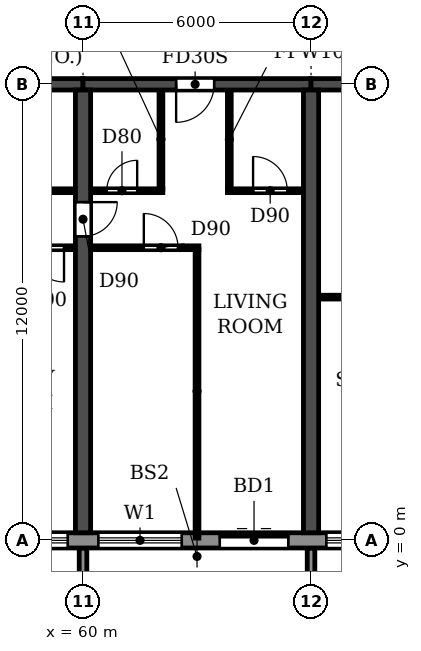
"""IFC4 building model, lengths in metres.
Left out: names, types, materials, properties, quantities, classifications, styles, units other than length and angle.
Written with IfcOpenShell. Run it as: python <this file> out.ifc"""

import sys

from ifc_helpers import new_model, si_unit, direction, frame, frame_2d, origin, place, context, subcontext, project, spatial, polyline, rectangle, outline, extrude, source, transform, mapped, element, fill, save


model = new_model("IFC4")
c1 = context("Model", 3, precision=1e-05, world=origin(), true_north=direction((0.0, 1.0)))
c2 = subcontext(c1, "Body", "Model", "MODEL_VIEW")
j1 = project(units=[si_unit("LENGTHUNIT", "METRE"), si_unit("PLANEANGLEUNIT", "RADIAN")], contexts=[c1])
p1 = place(None, origin())
s1 = spatial("IfcSite", under=j1, at=p1, CompositionType="ELEMENT")
p2 = place(p1, origin())
s2 = spatial("IfcBuilding", under=s1, at=p2, CompositionType="ELEMENT")
p3 = place(p2, frame((0.0, 0.0, 43.2)))
s3 = spatial("IfcBuildingStorey", under=s2, at=p3, CompositionType="ELEMENT", Elevation=43.2)
p4 = place(p3, frame((60.0, 0.2, 0.0), z_axis=(0.0, 0.0, 1.0), x_axis=(0.0, 1.0, 0.0)))
e1 = element("IfcWall", 1, at=p4, inside=s3, PredefinedType="SHEAR", context=c2, shape_type="SweptSolid", body=[
    extrude(rectangle(XDim=11.65, YDim=0.4, at=frame_2d((5.825, 0.0))), origin(), (0.0, 0.0, 1.0), 3.05),
])
p5 = place(p4, frame((7.8, 0.0, 0.0)))
e2 = element("IfcOpeningElement", 2, at=p5, cuts=e1, PredefinedType="OPENING", context=c2, shape_type="SweptSolid", body=[
    extrude(rectangle(XDim=0.9, YDim=2.1, at=frame_2d((0.45, 1.05))), frame((0.0, 0.21, 0.0), z_axis=(0.0, -1.0, 0.0), x_axis=(1.0, 0.0, 0.0)), (0.0, 0.0, 1.0), 0.42),
])
p6 = place(p3, frame((66.0, 0.2, 0.0), z_axis=(0.0, 0.0, 1.0), x_axis=(0.0, 1.0, 0.0)))
e3 = element("IfcWall", 3, at=p6, inside=s3, PredefinedType="SHEAR", context=c2, shape_type="SweptSolid", body=[
    extrude(rectangle(XDim=11.65, YDim=0.4, at=frame_2d((5.825, 0.0))), origin(), (0.0, 0.0, 1.0), 3.05),
])
p7 = place(p3, frame((54.0, 12.0, 0.0), z_axis=(0.0, 0.0, 1.0), x_axis=(1.0, 0.0, 0.0)))
e4 = element("IfcWall", 4, at=p7, inside=s3, PredefinedType="SHEAR", context=c2, shape_type="SweptSolid", body=[
    extrude(rectangle(XDim=6.0, YDim=0.3, at=frame_2d((3.0, 0.0))), origin(), (0.0, 0.0, 1.0), 2.45),
])
p8 = place(p3, frame((60.0, 12.0, 0.0), z_axis=(0.0, 0.0, 1.0), x_axis=(1.0, 0.0, 0.0)))
e5 = element("IfcWall", 5, at=p8, inside=s3, PredefinedType="SHEAR", context=c2, shape_type="SweptSolid", body=[
    extrude(rectangle(XDim=6.0, YDim=0.3, at=frame_2d((3.0, 0.0))), origin(), (0.0, 0.0, 1.0), 2.45),
])
p9 = place(p8, frame((2.45, 0.0, 0.0)))
e6 = element("IfcOpeningElement", 6, at=p9, cuts=e5, PredefinedType="OPENING", context=c2, shape_type="SweptSolid", body=[
    extrude(rectangle(XDim=1.0, YDim=2.1, at=frame_2d((0.5, 1.05))), frame((0.0, 0.16, 0.0), z_axis=(0.0, -1.0, 0.0), x_axis=(1.0, 0.0, 0.0)), (0.0, 0.0, 1.0), 0.32),
])
p10 = place(p3, frame((66.0, 12.0, 0.0), z_axis=(0.0, 0.0, 1.0), x_axis=(1.0, 0.0, 0.0)))
e7 = element("IfcWall", 7, at=p10, inside=s3, PredefinedType="SHEAR", context=c2, shape_type="SweptSolid", body=[
    extrude(rectangle(XDim=6.0, YDim=0.3, at=frame_2d((3.0, 0.0))), origin(), (0.0, 0.0, 1.0), 2.45),
])
p11 = place(p10, frame((2.55, 0.0, 0.0)))
e8 = element("IfcOpeningElement", 8, at=p11, cuts=e7, PredefinedType="OPENING", context=c2, shape_type="SweptSolid", body=[
    extrude(rectangle(XDim=1.0, YDim=2.1, at=frame_2d((0.5, 1.05))), frame((0.0, 0.16, 0.0), z_axis=(0.0, -1.0, 0.0), x_axis=(1.0, 0.0, 0.0)), (0.0, 0.0, 1.0), 0.32),
])
p12 = place(p3, frame((4.683, 0.0, 0.0), z_axis=(0.0, 0.0, 1.0), x_axis=(1.0, 0.0, 0.0)))
e9 = element("IfcWall", 9, at=p12, inside=s3, PredefinedType="STANDARD", context=c2, shape_type="SweptSolid", body=[
    extrude(rectangle(XDim=92.634, YDim=0.4, at=frame_2d((46.317, 0.0))), origin(), (0.0, 0.0, 1.0), 3.05),
])
p13 = place(p12, frame((1.717, 0.0, 0.9)))
e10 = element("IfcOpeningElement", 10, at=p13, cuts=e9, PredefinedType="OPENING", context=c2, shape_type="SweptSolid", body=[
    extrude(rectangle(XDim=2.2, YDim=1.5, at=frame_2d((1.1, 0.75))), frame((0.0, 0.21, 0.0), z_axis=(0.0, -1.0, 0.0), x_axis=(1.0, 0.0, 0.0)), (0.0, 0.0, 1.0), 0.42),
])
p14 = place(p12, frame((4.717, 0.0, 0.9)))
e11 = element("IfcOpeningElement", 11, at=p14, cuts=e9, PredefinedType="OPENING", context=c2, shape_type="SweptSolid", body=[
    extrude(rectangle(XDim=2.2, YDim=1.5, at=frame_2d((1.1, 0.75))), frame((0.0, 0.21, 0.0), z_axis=(0.0, -1.0, 0.0), x_axis=(1.0, 0.0, 0.0)), (0.0, 0.0, 1.0), 0.42),
])
p15 = place(p12, frame((7.717, 0.0, 0.9)))
e12 = element("IfcOpeningElement", 12, at=p15, cuts=e9, PredefinedType="OPENING", context=c2, shape_type="SweptSolid", body=[
    extrude(rectangle(XDim=2.2, YDim=1.5, at=frame_2d((1.1, 0.75))), frame((0.0, 0.21, 0.0), z_axis=(0.0, -1.0, 0.0), x_axis=(1.0, 0.0, 0.0)), (0.0, 0.0, 1.0), 0.42),
])
p16 = place(p12, frame((10.917, 0.0, 0.0)))
e13 = element("IfcOpeningElement", 13, at=p16, cuts=e9, PredefinedType="OPENING", context=c2, shape_type="SweptSolid", body=[
    extrude(rectangle(XDim=1.8, YDim=2.4, at=frame_2d((0.9, 1.2))), frame((0.0, 0.21, 0.0), z_axis=(0.0, -1.0, 0.0), x_axis=(1.0, 0.0, 0.0)), (0.0, 0.0, 1.0), 0.42),
])
p17 = place(p12, frame((13.717, 0.0, 0.9)))
e14 = element("IfcOpeningElement", 14, at=p17, cuts=e9, PredefinedType="OPENING", context=c2, shape_type="SweptSolid", body=[
    extrude(rectangle(XDim=2.2, YDim=1.5, at=frame_2d((1.1, 0.75))), frame((0.0, 0.21, 0.0), z_axis=(0.0, -1.0, 0.0), x_axis=(1.0, 0.0, 0.0)), (0.0, 0.0, 1.0), 0.42),
])
p18 = place(p12, frame((16.717, 0.0, 0.9)))
e15 = element("IfcOpeningElement", 15, at=p18, cuts=e9, PredefinedType="OPENING", context=c2, shape_type="SweptSolid", body=[
    extrude(rectangle(XDim=2.2, YDim=1.5, at=frame_2d((1.1, 0.75))), frame((0.0, 0.21, 0.0), z_axis=(0.0, -1.0, 0.0), x_axis=(1.0, 0.0, 0.0)), (0.0, 0.0, 1.0), 0.42),
])
p19 = place(p12, frame((19.917, 0.0, 0.0)))
e16 = element("IfcOpeningElement", 16, at=p19, cuts=e9, PredefinedType="OPENING", context=c2, shape_type="SweptSolid", body=[
    extrude(rectangle(XDim=1.8, YDim=2.4, at=frame_2d((0.9, 1.2))), frame((0.0, 0.21, 0.0), z_axis=(0.0, -1.0, 0.0), x_axis=(1.0, 0.0, 0.0)), (0.0, 0.0, 1.0), 0.42),
])
p20 = place(p12, frame((22.717, 0.0, 0.9)))
e17 = element("IfcOpeningElement", 17, at=p20, cuts=e9, PredefinedType="OPENING", context=c2, shape_type="SweptSolid", body=[
    extrude(rectangle(XDim=2.2, YDim=1.5, at=frame_2d((1.1, 0.75))), frame((0.0, 0.21, 0.0), z_axis=(0.0, -1.0, 0.0), x_axis=(1.0, 0.0, 0.0)), (0.0, 0.0, 1.0), 0.42),
])
p21 = place(p12, frame((25.717, 0.0, 0.9)))
e18 = element("IfcOpeningElement", 18, at=p21, cuts=e9, PredefinedType="OPENING", context=c2, shape_type="SweptSolid", body=[
    extrude(rectangle(XDim=2.2, YDim=1.5, at=frame_2d((1.1, 0.75))), frame((0.0, 0.21, 0.0), z_axis=(0.0, -1.0, 0.0), x_axis=(1.0, 0.0, 0.0)), (0.0, 0.0, 1.0), 0.42),
])
p22 = place(p12, frame((28.717, 0.0, 0.9)))
e19 = element("IfcOpeningElement", 19, at=p22, cuts=e9, PredefinedType="OPENING", context=c2, shape_type="SweptSolid", body=[
    extrude(rectangle(XDim=2.2, YDim=1.5, at=frame_2d((1.1, 0.75))), frame((0.0, 0.21, 0.0), z_axis=(0.0, -1.0, 0.0), x_axis=(1.0, 0.0, 0.0)), (0.0, 0.0, 1.0), 0.42),
])
p23 = place(p12, frame((31.717, 0.0, 0.9)))
e20 = element("IfcOpeningElement", 20, at=p23, cuts=e9, PredefinedType="OPENING", context=c2, shape_type="SweptSolid", body=[
    extrude(rectangle(XDim=2.2, YDim=1.5, at=frame_2d((1.1, 0.75))), frame((0.0, 0.21, 0.0), z_axis=(0.0, -1.0, 0.0), x_axis=(1.0, 0.0, 0.0)), (0.0, 0.0, 1.0), 0.42),
])
p24 = place(p12, frame((34.917, 0.0, 0.0)))
e21 = element("IfcOpeningElement", 21, at=p24, cuts=e9, PredefinedType="OPENING", context=c2, shape_type="SweptSolid", body=[
    extrude(rectangle(XDim=1.8, YDim=2.4, at=frame_2d((0.9, 1.2))), frame((0.0, 0.21, 0.0), z_axis=(0.0, -1.0, 0.0), x_axis=(1.0, 0.0, 0.0)), (0.0, 0.0, 1.0), 0.42),
])
p25 = place(p12, frame((37.717, 0.0, 0.9)))
e22 = element("IfcOpeningElement", 22, at=p25, cuts=e9, PredefinedType="OPENING", context=c2, shape_type="SweptSolid", body=[
    extrude(rectangle(XDim=2.2, YDim=1.5, at=frame_2d((1.1, 0.75))), frame((0.0, 0.21, 0.0), z_axis=(0.0, -1.0, 0.0), x_axis=(1.0, 0.0, 0.0)), (0.0, 0.0, 1.0), 0.42),
])
p26 = place(p12, frame((40.717, 0.0, 0.9)))
e23 = element("IfcOpeningElement", 23, at=p26, cuts=e9, PredefinedType="OPENING", context=c2, shape_type="SweptSolid", body=[
    extrude(rectangle(XDim=2.2, YDim=1.5, at=frame_2d((1.1, 0.75))), frame((0.0, 0.21, 0.0), z_axis=(0.0, -1.0, 0.0), x_axis=(1.0, 0.0, 0.0)), (0.0, 0.0, 1.0), 0.42),
])
p27 = place(p12, frame((43.717, 0.0, 0.9)))
e24 = element("IfcOpeningElement", 24, at=p27, cuts=e9, PredefinedType="OPENING", context=c2, shape_type="SweptSolid", body=[
    extrude(rectangle(XDim=2.2, YDim=1.5, at=frame_2d((1.1, 0.75))), frame((0.0, 0.21, 0.0), z_axis=(0.0, -1.0, 0.0), x_axis=(1.0, 0.0, 0.0)), (0.0, 0.0, 1.0), 0.42),
])
p28 = place(p12, frame((46.917, 0.0, 0.0)))
e25 = element("IfcOpeningElement", 25, at=p28, cuts=e9, PredefinedType="OPENING", context=c2, shape_type="SweptSolid", body=[
    extrude(rectangle(XDim=1.8, YDim=2.4, at=frame_2d((0.9, 1.2))), frame((0.0, 0.21, 0.0), z_axis=(0.0, -1.0, 0.0), x_axis=(1.0, 0.0, 0.0)), (0.0, 0.0, 1.0), 0.42),
])
p29 = place(p12, frame((49.717, 0.0, 0.9)))
e26 = element("IfcOpeningElement", 26, at=p29, cuts=e9, PredefinedType="OPENING", context=c2, shape_type="SweptSolid", body=[
    extrude(rectangle(XDim=2.2, YDim=1.5, at=frame_2d((1.1, 0.75))), frame((0.0, 0.21, 0.0), z_axis=(0.0, -1.0, 0.0), x_axis=(1.0, 0.0, 0.0)), (0.0, 0.0, 1.0), 0.42),
])
p30 = place(p12, frame((52.717, 0.0, 0.9)))
e27 = element("IfcOpeningElement", 27, at=p30, cuts=e9, PredefinedType="OPENING", context=c2, shape_type="SweptSolid", body=[
    extrude(rectangle(XDim=2.2, YDim=1.5, at=frame_2d((1.1, 0.75))), frame((0.0, 0.21, 0.0), z_axis=(0.0, -1.0, 0.0), x_axis=(1.0, 0.0, 0.0)), (0.0, 0.0, 1.0), 0.42),
])
p31 = place(p12, frame((55.717, 0.0, 0.9)))
e28 = element("IfcOpeningElement", 28, at=p31, cuts=e9, PredefinedType="OPENING", context=c2, shape_type="SweptSolid", body=[
    extrude(rectangle(XDim=2.2, YDim=1.5, at=frame_2d((1.1, 0.75))), frame((0.0, 0.21, 0.0), z_axis=(0.0, -1.0, 0.0), x_axis=(1.0, 0.0, 0.0)), (0.0, 0.0, 1.0), 0.42),
])
p32 = place(p12, frame((58.917, 0.0, 0.0)))
e29 = element("IfcOpeningElement", 29, at=p32, cuts=e9, PredefinedType="OPENING", context=c2, shape_type="SweptSolid", body=[
    extrude(rectangle(XDim=1.8, YDim=2.4, at=frame_2d((0.9, 1.2))), frame((0.0, 0.21, 0.0), z_axis=(0.0, -1.0, 0.0), x_axis=(1.0, 0.0, 0.0)), (0.0, 0.0, 1.0), 0.42),
])
p33 = place(p12, frame((61.717, 0.0, 0.9)))
e30 = element("IfcOpeningElement", 30, at=p33, cuts=e9, PredefinedType="OPENING", context=c2, shape_type="SweptSolid", body=[
    extrude(rectangle(XDim=2.2, YDim=1.5, at=frame_2d((1.1, 0.75))), frame((0.0, 0.21, 0.0), z_axis=(0.0, -1.0, 0.0), x_axis=(1.0, 0.0, 0.0)), (0.0, 0.0, 1.0), 0.42),
])
p34 = place(p12, frame((64.717, 0.0, 0.9)))
e31 = element("IfcOpeningElement", 31, at=p34, cuts=e9, PredefinedType="OPENING", context=c2, shape_type="SweptSolid", body=[
    extrude(rectangle(XDim=2.2, YDim=1.5, at=frame_2d((1.1, 0.75))), frame((0.0, 0.21, 0.0), z_axis=(0.0, -1.0, 0.0), x_axis=(1.0, 0.0, 0.0)), (0.0, 0.0, 1.0), 0.42),
])
p35 = place(p12, frame((67.717, 0.0, 0.9)))
e32 = element("IfcOpeningElement", 32, at=p35, cuts=e9, PredefinedType="OPENING", context=c2, shape_type="SweptSolid", body=[
    extrude(rectangle(XDim=2.2, YDim=1.5, at=frame_2d((1.1, 0.75))), frame((0.0, 0.21, 0.0), z_axis=(0.0, -1.0, 0.0), x_axis=(1.0, 0.0, 0.0)), (0.0, 0.0, 1.0), 0.42),
])
p36 = place(p12, frame((70.917, 0.0, 0.0)))
e33 = element("IfcOpeningElement", 33, at=p36, cuts=e9, PredefinedType="OPENING", context=c2, shape_type="SweptSolid", body=[
    extrude(rectangle(XDim=1.8, YDim=2.4, at=frame_2d((0.9, 1.2))), frame((0.0, 0.21, 0.0), z_axis=(0.0, -1.0, 0.0), x_axis=(1.0, 0.0, 0.0)), (0.0, 0.0, 1.0), 0.42),
])
p37 = place(p12, frame((73.717, 0.0, 0.9)))
e34 = element("IfcOpeningElement", 34, at=p37, cuts=e9, PredefinedType="OPENING", context=c2, shape_type="SweptSolid", body=[
    extrude(rectangle(XDim=2.2, YDim=1.5, at=frame_2d((1.1, 0.75))), frame((0.0, 0.21, 0.0), z_axis=(0.0, -1.0, 0.0), x_axis=(1.0, 0.0, 0.0)), (0.0, 0.0, 1.0), 0.42),
])
p38 = place(p12, frame((76.717, 0.0, 0.9)))
e35 = element("IfcOpeningElement", 35, at=p38, cuts=e9, PredefinedType="OPENING", context=c2, shape_type="SweptSolid", body=[
    extrude(rectangle(XDim=2.2, YDim=1.5, at=frame_2d((1.1, 0.75))), frame((0.0, 0.21, 0.0), z_axis=(0.0, -1.0, 0.0), x_axis=(1.0, 0.0, 0.0)), (0.0, 0.0, 1.0), 0.42),
])
p39 = place(p12, frame((79.717, 0.0, 0.9)))
e36 = element("IfcOpeningElement", 36, at=p39, cuts=e9, PredefinedType="OPENING", context=c2, shape_type="SweptSolid", body=[
    extrude(rectangle(XDim=2.2, YDim=1.5, at=frame_2d((1.1, 0.75))), frame((0.0, 0.21, 0.0), z_axis=(0.0, -1.0, 0.0), x_axis=(1.0, 0.0, 0.0)), (0.0, 0.0, 1.0), 0.42),
])
p40 = place(p12, frame((82.917, 0.0, 0.0)))
e37 = element("IfcOpeningElement", 37, at=p40, cuts=e9, PredefinedType="OPENING", context=c2, shape_type="SweptSolid", body=[
    extrude(rectangle(XDim=1.8, YDim=2.4, at=frame_2d((0.9, 1.2))), frame((0.0, 0.21, 0.0), z_axis=(0.0, -1.0, 0.0), x_axis=(1.0, 0.0, 0.0)), (0.0, 0.0, 1.0), 0.42),
])
p41 = place(p12, frame((85.717, 0.0, 0.9)))
e38 = element("IfcOpeningElement", 38, at=p41, cuts=e9, PredefinedType="OPENING", context=c2, shape_type="SweptSolid", body=[
    extrude(rectangle(XDim=2.2, YDim=1.5, at=frame_2d((1.1, 0.75))), frame((0.0, 0.21, 0.0), z_axis=(0.0, -1.0, 0.0), x_axis=(1.0, 0.0, 0.0)), (0.0, 0.0, 1.0), 0.42),
])
p42 = place(p12, frame((88.717, 0.0, 0.9)))
e39 = element("IfcOpeningElement", 39, at=p42, cuts=e9, PredefinedType="OPENING", context=c2, shape_type="SweptSolid", body=[
    extrude(rectangle(XDim=2.2, YDim=1.5, at=frame_2d((1.1, 0.75))), frame((0.0, 0.21, 0.0), z_axis=(0.0, -1.0, 0.0), x_axis=(1.0, 0.0, 0.0)), (0.0, 0.0, 1.0), 0.42),
])
m1 = source(origin(), c2, "Body", "SweptSolid", [
    extrude(outline(polyline([(0.0, 0.0), (0.2, 0.0), (0.2, 1.65), (0.0, 1.65), (0.0, 0.0)])), origin(), (0.0, 0.0, 1.0), 3.1),
])
for number, where in (
    (40, (59.9, -1.85, 0.0)),
    (41, (65.9, -1.85, 0.0)),
):
    element("IfcWall", number, at=place(p3, frame(where)), inside=s3, PredefinedType="STANDARD", context=c2, shape_type="MappedRepresentation", body=[
        mapped(m1, transform((0.0, 0.0, 0.0))),
    ])
p43 = place(p3, frame((66.21, 6.4, 0.0), z_axis=(0.0, 0.0, 1.0), x_axis=(1.0, 0.0, 0.0)))
e42 = element("IfcWall", 42, at=p43, inside=s3, PredefinedType="PARTITIONING", context=c2, shape_type="SweptSolid", body=[
    extrude(rectangle(XDim=1.99, YDim=0.1, at=frame_2d((0.995, 0.0))), origin(), (0.0, 0.0, 1.0), 3.05),
])
p44 = place(p3, frame((57.1, 7.7, 0.0), z_axis=(0.0, 0.0, 1.0), x_axis=(1.0, 0.0, 0.0)))
e43 = element("IfcWall", 43, at=p44, inside=s3, PredefinedType="PARTITIONING", context=c2, shape_type="SweptSolid", body=[
    extrude(rectangle(XDim=2.69, YDim=0.1, at=frame_2d((1.345, 0.0))), origin(), (0.0, 0.0, 1.0), 3.05),
])
p45 = place(p44, frame((1.5, 0.0, 0.0)))
e44 = element("IfcOpeningElement", 44, at=p45, cuts=e43, PredefinedType="OPENING", context=c2, shape_type="SweptSolid", body=[
    extrude(rectangle(XDim=0.9, YDim=2.1, at=frame_2d((0.45, 1.05))), frame((0.0, 0.06, 0.0), z_axis=(0.0, -1.0, 0.0), x_axis=(1.0, 0.0, 0.0)), (0.0, 0.0, 1.0), 0.12),
])
p46 = place(p3, frame((60.21, 7.7, 0.0), z_axis=(0.0, 0.0, 1.0), x_axis=(1.0, 0.0, 0.0)))
e45 = element("IfcWall", 45, at=p46, inside=s3, PredefinedType="PARTITIONING", context=c2, shape_type="SweptSolid", body=[
    extrude(rectangle(XDim=2.84, YDim=0.1, at=frame_2d((1.42, 0.0))), origin(), (0.0, 0.0, 1.0), 3.05),
])
p47 = place(p46, frame((1.39, 0.0, 0.0)))
e46 = element("IfcOpeningElement", 46, at=p47, cuts=e45, PredefinedType="OPENING", context=c2, shape_type="SweptSolid", body=[
    extrude(rectangle(XDim=0.9, YDim=2.1, at=frame_2d((0.45, 1.05))), frame((0.0, 0.06, 0.0), z_axis=(0.0, -1.0, 0.0), x_axis=(1.0, 0.0, 0.0)), (0.0, 0.0, 1.0), 0.12),
])
p48 = place(p3, frame((57.1, 9.2, 0.0), z_axis=(0.0, 0.0, 1.0), x_axis=(1.0, 0.0, 0.0)))
e47 = element("IfcWall", 47, at=p48, inside=s3, PredefinedType="PARTITIONING", context=c2, shape_type="SweptSolid", body=[
    extrude(rectangle(XDim=2.69, YDim=0.1, at=frame_2d((1.345, 0.0))), origin(), (0.0, 0.0, 1.0), 3.05),
])
p49 = place(p48, frame((1.0, 0.0, 0.0)))
e48 = element("IfcOpeningElement", 48, at=p49, cuts=e47, PredefinedType="OPENING", context=c2, shape_type="SweptSolid", body=[
    extrude(rectangle(XDim=0.8, YDim=2.1, at=frame_2d((0.4, 1.05))), frame((0.0, 0.06, 0.0), z_axis=(0.0, -1.0, 0.0), x_axis=(1.0, 0.0, 0.0)), (0.0, 0.0, 1.0), 0.12),
])
p50 = place(p3, frame((60.21, 9.2, 0.0), z_axis=(0.0, 0.0, 1.0), x_axis=(1.0, 0.0, 0.0)))
e49 = element("IfcWall", 49, at=p50, inside=s3, PredefinedType="PARTITIONING", context=c2, shape_type="SweptSolid", body=[
    extrude(rectangle(XDim=1.89, YDim=0.1, at=frame_2d((0.945, 0.0))), origin(), (0.0, 0.0, 1.0), 3.05),
])
p51 = place(p50, frame((0.415, 0.0, 0.0)))
e50 = element("IfcOpeningElement", 50, at=p51, cuts=e49, PredefinedType="OPENING", context=c2, shape_type="SweptSolid", body=[
    extrude(rectangle(XDim=0.8, YDim=2.1, at=frame_2d((0.4, 1.05))), frame((0.0, 0.06, 0.0), z_axis=(0.0, -1.0, 0.0), x_axis=(1.0, 0.0, 0.0)), (0.0, 0.0, 1.0), 0.12),
])
p52 = place(p3, frame((63.8, 9.2, 0.0), z_axis=(0.0, 0.0, 1.0), x_axis=(1.0, 0.0, 0.0)))
e51 = element("IfcWall", 51, at=p52, inside=s3, PredefinedType="PARTITIONING", context=c2, shape_type="SweptSolid", body=[
    extrude(rectangle(XDim=1.99, YDim=0.1, at=frame_2d((0.995, 0.0))), origin(), (0.0, 0.0, 1.0), 3.05),
])
p53 = place(p52, frame((0.675, 0.0, 0.0)))
e52 = element("IfcOpeningElement", 52, at=p53, cuts=e51, PredefinedType="OPENING", context=c2, shape_type="SweptSolid", body=[
    extrude(rectangle(XDim=0.9, YDim=2.1, at=frame_2d((0.45, 1.05))), frame((0.0, 0.06, 0.0), z_axis=(0.0, -1.0, 0.0), x_axis=(1.0, 0.0, 0.0)), (0.0, 0.0, 1.0), 0.12),
])
p54 = place(p3, frame((62.05, 9.25, 0.0), z_axis=(0.0, 0.0, 1.0), x_axis=(0.0, 1.0, 0.0)))
e53 = element("IfcWall", 53, at=p54, inside=s3, PredefinedType="PARTITIONING", context=c2, shape_type="SweptSolid", body=[
    extrude(rectangle(XDim=2.59, YDim=0.1, at=frame_2d((1.295, 0.0))), origin(), (0.0, 0.0, 1.0), 3.05),
])
p55 = place(p3, frame((63.0, 0.06, 0.0), z_axis=(0.0, 0.0, 1.0), x_axis=(0.0, 1.0, 0.0)))
e54 = element("IfcWall", 54, at=p55, inside=s3, PredefinedType="PARTITIONING", context=c2, shape_type="SweptSolid", body=[
    extrude(rectangle(XDim=7.59, YDim=0.1, at=frame_2d((3.795, 0.0))), origin(), (0.0, 0.0, 1.0), 3.05),
])
p56 = place(p3, frame((63.85, 9.25, 0.0), z_axis=(0.0, 0.0, 1.0), x_axis=(0.0, 1.0, 0.0)))
e55 = element("IfcWall", 55, at=p56, inside=s3, PredefinedType="PARTITIONING", context=c2, shape_type="SweptSolid", body=[
    extrude(rectangle(XDim=2.59, YDim=0.1, at=frame_2d((1.295, 0.0))), origin(), (0.0, 0.0, 1.0), 3.05),
])
p57 = place(p30, origin())
e56 = element("IfcWindow", 56, at=p57, inside=s3, PartitioningType="DOUBLE_PANEL_HORIZONTAL", PredefinedType="WINDOW", context=c2, shape_type="SweptSolid", body=[
    extrude(rectangle(XDim=2.2, YDim=1.5, at=frame_2d((1.1, 0.75))), frame((0.0, 0.03, 0.0), z_axis=(0.0, -1.0, 0.0), x_axis=(1.0, 0.0, 0.0)), (0.0, 0.0, 1.0), 0.06),
])
fill(e27, e56)
p58 = place(p31, origin())
e57 = element("IfcWindow", 57, at=p58, inside=s3, PartitioningType="DOUBLE_PANEL_HORIZONTAL", PredefinedType="WINDOW", context=c2, shape_type="SweptSolid", body=[
    extrude(rectangle(XDim=2.2, YDim=1.5, at=frame_2d((1.1, 0.75))), frame((0.0, 0.03, 0.0), z_axis=(0.0, -1.0, 0.0), x_axis=(1.0, 0.0, 0.0)), (0.0, 0.0, 1.0), 0.06),
])
fill(e28, e57)
p59 = place(p32, origin())
e58 = element("IfcDoor", 58, at=p59, inside=s3, OperationType="DOUBLE_DOOR_SLIDING", PredefinedType="DOOR", context=c2, shape_type="SweptSolid", body=[
    extrude(rectangle(XDim=1.8, YDim=2.4, at=frame_2d((0.9, 1.2))), frame((0.0, 0.025, 0.0), z_axis=(0.0, -1.0, 0.0), x_axis=(1.0, 0.0, 0.0)), (0.0, 0.0, 1.0), 0.05),
])
fill(e29, e58)
p60 = place(p33, origin())
e59 = element("IfcWindow", 59, at=p60, inside=s3, PartitioningType="DOUBLE_PANEL_HORIZONTAL", PredefinedType="WINDOW", context=c2, shape_type="SweptSolid", body=[
    extrude(rectangle(XDim=2.2, YDim=1.5, at=frame_2d((1.1, 0.75))), frame((0.0, 0.03, 0.0), z_axis=(0.0, -1.0, 0.0), x_axis=(1.0, 0.0, 0.0)), (0.0, 0.0, 1.0), 0.06),
])
fill(e30, e59)
p61 = place(p45, frame((0.9, 0.0, 0.0), z_axis=(0.0, 0.0, 1.0), x_axis=(-1.0, 0.0, 0.0)))
e60 = element("IfcDoor", 60, at=p61, inside=s3, OperationType="SINGLE_SWING_LEFT", PredefinedType="DOOR", context=c2, shape_type="SweptSolid", body=[
    extrude(rectangle(XDim=0.9, YDim=2.1, at=frame_2d((0.45, 1.05))), frame((0.0, 0.025, 0.0), z_axis=(0.0, -1.0, 0.0), x_axis=(1.0, 0.0, 0.0)), (0.0, 0.0, 1.0), 0.05),
])
fill(e44, e60)
p62 = place(p5, frame((0.9, 0.0, 0.0), z_axis=(0.0, 0.0, 1.0), x_axis=(-1.0, 0.0, 0.0)))
e61 = element("IfcDoor", 61, at=p62, inside=s3, OperationType="SINGLE_SWING_LEFT", PredefinedType="DOOR", context=c2, shape_type="SweptSolid", body=[
    extrude(rectangle(XDim=0.9, YDim=2.1, at=frame_2d((0.45, 1.05))), frame((0.0, 0.025, 0.0), z_axis=(0.0, -1.0, 0.0), x_axis=(1.0, 0.0, 0.0)), (0.0, 0.0, 1.0), 0.05),
])
fill(e2, e61)
p63 = place(p51, origin())
e62 = element("IfcDoor", 62, at=p63, inside=s3, OperationType="SINGLE_SWING_RIGHT", PredefinedType="DOOR", context=c2, shape_type="SweptSolid", body=[
    extrude(rectangle(XDim=0.8, YDim=2.1, at=frame_2d((0.4, 1.05))), frame((0.0, 0.025, 0.0), z_axis=(0.0, -1.0, 0.0), x_axis=(1.0, 0.0, 0.0)), (0.0, 0.0, 1.0), 0.05),
])
fill(e50, e62)
p64 = place(p47, origin())
e63 = element("IfcDoor", 63, at=p64, inside=s3, OperationType="SINGLE_SWING_LEFT", PredefinedType="DOOR", context=c2, shape_type="SweptSolid", body=[
    extrude(rectangle(XDim=0.9, YDim=2.1, at=frame_2d((0.45, 1.05))), frame((0.0, 0.025, 0.0), z_axis=(0.0, -1.0, 0.0), x_axis=(1.0, 0.0, 0.0)), (0.0, 0.0, 1.0), 0.05),
])
fill(e46, e63)
p65 = place(p9, frame((1.0, 0.0, 0.0), z_axis=(0.0, 0.0, 1.0), x_axis=(-1.0, 0.0, 0.0)))
e64 = element("IfcDoor", 64, at=p65, inside=s3, OperationType="SINGLE_SWING_RIGHT", PredefinedType="DOOR", context=c2, shape_type="SweptSolid", body=[
    extrude(rectangle(XDim=1.0, YDim=2.1, at=frame_2d((0.5, 1.05))), frame((0.0, 0.025, 0.0), z_axis=(0.0, -1.0, 0.0), x_axis=(1.0, 0.0, 0.0)), (0.0, 0.0, 1.0), 0.05),
])
fill(e6, e64)
p66 = place(p53, origin())
e65 = element("IfcDoor", 65, at=p66, inside=s3, OperationType="SINGLE_SWING_LEFT", PredefinedType="DOOR", context=c2, shape_type="SweptSolid", body=[
    extrude(rectangle(XDim=0.9, YDim=2.1, at=frame_2d((0.45, 1.05))), frame((0.0, 0.025, 0.0), z_axis=(0.0, -1.0, 0.0), x_axis=(1.0, 0.0, 0.0)), (0.0, 0.0, 1.0), 0.05),
])
fill(e52, e65)
save(model, sys.argv[1])
